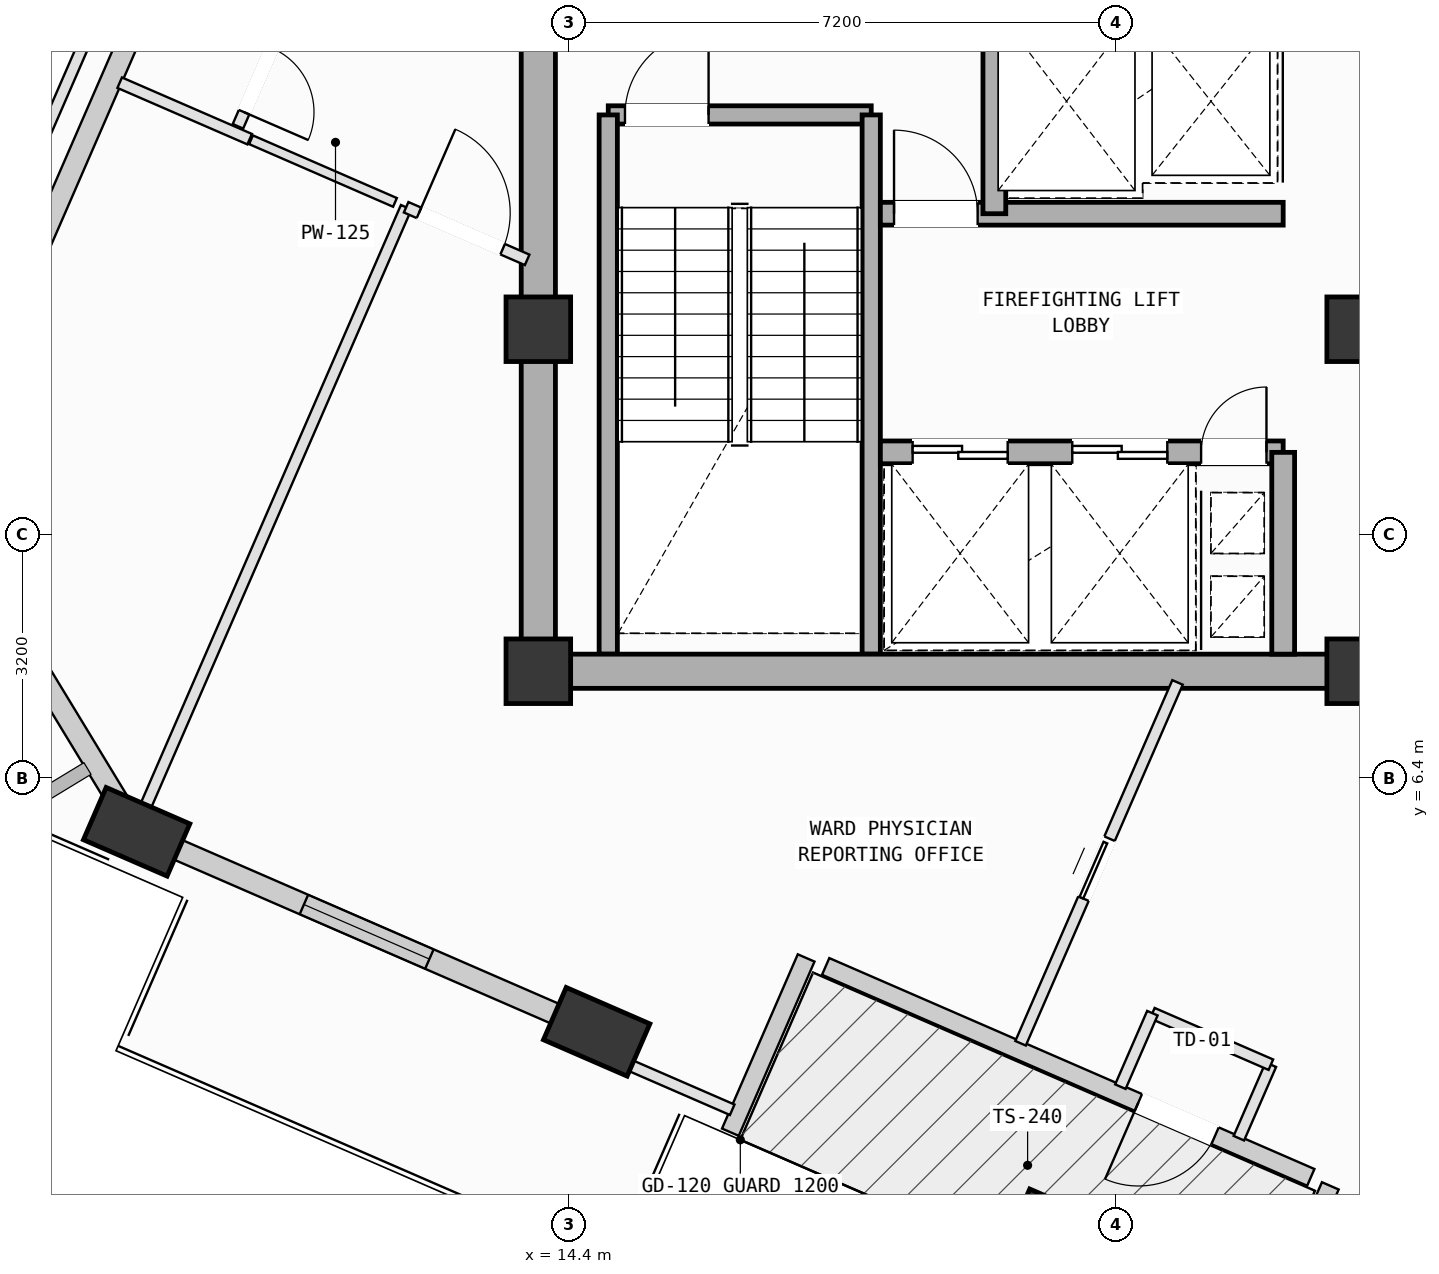
"""IFC4 building model, lengths in metres.
Left out: names, types, materials, properties, quantities, classifications, styles, units other than length and angle.
Written with IfcOpenShell. Run it as: python <this file> out.ifc"""

import sys

from ifc_helpers import new_model, si_unit, direction, frame, frame_2d, origin, origin_2d, place, context, subcontext, project, spatial, rectangle, extrude, element, fill, save


model = new_model("IFC4")
c1 = context("Model", 3, precision=1e-05, world=origin(), true_north=direction((0.0, 1.0)))
c2 = subcontext(c1, "Body", "Model", "MODEL_VIEW")
j1 = project(units=[si_unit("LENGTHUNIT", "METRE"), si_unit("PLANEANGLEUNIT", "RADIAN")], contexts=[c1])
p1 = place(None, origin())
s1 = spatial("IfcSite", under=j1, at=p1, CompositionType="ELEMENT")
p2 = place(p1, origin())
s2 = spatial("IfcBuilding", under=s1, at=p2, CompositionType="ELEMENT")
p3 = place(p2, frame((0.0, 0.0, 312.6)))
s3 = spatial("IfcBuildingStorey", under=s2, at=p3, CompositionType="ELEMENT", Elevation=312.6)
for number, where, z_axis, x_axis in (
    (1, (14.0, 7.8, 0.0), (0.0, 0.0, 1.0), (1.0, 0.0, 0.0)),
    (2, (14.0, 12.3, 0.0), (0.0, 0.0, 1.0), (1.0, 0.0, 0.0)),
    (3, (24.8, 7.8, 0.0), (0.0, 0.0, 1.0), (1.0, 0.0, 0.0)),
    (4, (24.8, 12.3, 0.0), (0.0, 0.0, 1.0), (1.0, 0.0, 0.0)),
):
    element("IfcColumn", number, at=place(p3, frame(where, z_axis=z_axis, x_axis=x_axis)), inside=s3, PredefinedType="COLUMN", context=c2, shape_type="SweptSolid", body=[
        extrude(rectangle(XDim=0.85, YDim=0.85, at=origin_2d()), origin(), (0.0, 0.0, 1.0), 4.0),
    ])
for number, where, z_axis, x_axis in (
    (5, (8.715, 5.688, 0.002), (0.0, 0.0, 1.0), (-0.917, 0.399, 0.0)),
    (6, (14.768, 3.056, 0.002), (0.0, 0.0, 1.0), (-0.917, 0.399, 0.0)),
    (7, (20.866, 0.404, 0.002), (0.0, 0.0, 1.0), (-0.917, 0.399, 0.0)),
):
    element("IfcColumn", number, at=place(p3, frame(where, z_axis=z_axis, x_axis=x_axis)), inside=s3, PredefinedType="COLUMN", context=c2, shape_type="SweptSolid", body=[
        extrude(rectangle(XDim=1.2, YDim=0.75, at=origin_2d()), origin(), (0.0, 0.0, 1.0), 3.996),
    ])
p4 = place(p3, frame((24.163, 1.141, 0.0), z_axis=(0.0, 0.0, 1.0), x_axis=(-0.917051093992, 0.39876972178, 0.0)))
e8 = element("IfcWall", 8, at=p4, inside=s3, PredefinedType="SOLIDWALL", context=c2, shape_type="SweptSolid", body=[
    extrude(rectangle(XDim=6.96, YDim=0.24, at=frame_2d((3.48, 0.0))), origin(), (0.0, 0.0, 1.0), 3.265),
])
p5 = place(p4, frame((1.373, 0.0, 0.0)))
e9 = element("IfcOpeningElement", 9, at=p5, cuts=e8, PredefinedType="OPENING", context=c2, shape_type="SweptSolid", body=[
    extrude(rectangle(XDim=1.1, YDim=2.15, at=frame_2d((0.55, 1.075))), frame((0.0, 0.13, 0.0), z_axis=(0.0, -1.0, 0.0), x_axis=(1.0, 0.0, 0.0)), (0.0, 0.0, 1.0), 0.26),
])
for number, where, z_axis, x_axis in (
    (10, (23.423, -1.264, 0.0), (0.0, 0.0, 1.0), (0.399, 0.917, 0.0)),
    (11, (17.524, 4.028, 0.0), (0.0, 0.0, 1.0), (-0.399, -0.917, 0.0)),
):
    element("IfcWall", number, at=place(p3, frame(where, z_axis=z_axis, x_axis=x_axis)), inside=s3, PredefinedType="SOLIDWALL", context=c2, shape_type="SweptSolid", body=[
        extrude(rectangle(XDim=2.5, YDim=0.24, at=frame_2d((1.25, 0.0))), origin(), (0.0, 0.0, 1.0), 3.265),
    ])
p6 = place(p3, frame((6.172, 10.498, 0.0), z_axis=(0.0, 0.0, 1.0), x_axis=(0.398740578379, 0.917063766133, 0.0)))
e12 = element("IfcWall", 12, at=p6, inside=s3, PredefinedType="SOLIDWALL", context=c2, shape_type="SweptSolid", body=[
    extrude(rectangle(XDim=7.405, YDim=0.28, at=frame_2d((3.702, 0.0))), origin(), (0.0, 0.0, 1.0), 3.265),
])
p7 = place(p3, frame((8.509, 6.027, 0.0), z_axis=(0.0, 0.0, 1.0), x_axis=(-0.51924554751, 0.854625099907, 0.0)))
e13 = element("IfcWall", 13, at=p7, inside=s3, PredefinedType="SOLIDWALL", context=c2, shape_type="SweptSolid", body=[
    extrude(rectangle(XDim=4.407, YDim=0.28, at=frame_2d((2.204, 0.0))), origin(), (0.0, 0.0, 1.0), 3.265),
])
p8 = place(p3, frame((14.403, 3.215, 0.0), z_axis=(0.0, 0.0, 1.0), x_axis=(-0.917061363729, 0.398746103624, 0.0)))
e14 = element("IfcWall", 14, at=p8, inside=s3, PredefinedType="SOLIDWALL", context=c2, shape_type="SweptSolid", body=[
    extrude(rectangle(XDim=5.805, YDim=0.28, at=frame_2d((2.902, 0.0))), origin(), (0.0, 0.0, 1.0), 3.245),
])
p9 = place(p8, frame((2.002, 0.0, 0.75)))
e15 = element("IfcOpeningElement", 15, at=p9, cuts=e14, PredefinedType="OPENING", context=c2, shape_type="SweptSolid", body=[
    extrude(rectangle(XDim=1.8, YDim=2.05, at=frame_2d((0.9, 1.025))), frame((0.0, 0.15, 0.0), z_axis=(0.0, -1.0, 0.0), x_axis=(1.0, 0.0, 0.0)), (0.0, 0.0, 1.0), 0.3),
])
p10 = place(p3, frame((14.92, 15.12, 0.0), z_axis=(0.0, 0.0, 1.0), x_axis=(1.0, 0.0, 0.0)))
e16 = element("IfcWall", 16, at=p10, inside=s3, PredefinedType="SOLIDWALL", context=c2, shape_type="SweptSolid", body=[
    extrude(rectangle(XDim=3.46, YDim=0.24, at=frame_2d((1.73, 0.0))), origin(), (0.0, 0.0, 1.0), 3.78),
])
p11 = place(p10, frame((0.22, 0.0, 0.0)))
e17 = element("IfcOpeningElement", 17, at=p11, cuts=e16, PredefinedType="OPENING", context=c2, shape_type="SweptSolid", body=[
    extrude(rectangle(XDim=1.1, YDim=2.15, at=frame_2d((0.55, 1.075))), frame((0.0, 0.13, 0.0), z_axis=(0.0, -1.0, 0.0), x_axis=(1.0, 0.0, 0.0)), (0.0, 0.0, 1.0), 0.26),
])
for number, where, z_axis, x_axis in (
    (18, (18.38, 15.12, 0.0), (0.0, 0.0, 1.0), (0.0, -1.0, 0.0)),
    (19, (14.92, 8.025, 0.0), (0.0, 0.0, 1.0), (0.0, 1.0, 0.0)),
):
    element("IfcWall", number, at=place(p3, frame(where, z_axis=z_axis, x_axis=x_axis)), inside=s3, PredefinedType="SOLIDWALL", context=c2, shape_type="SweptSolid", body=[
        extrude(rectangle(XDim=7.095, YDim=0.24, at=frame_2d((3.548, 0.0))), origin(), (0.0, 0.0, 1.0), 3.78),
    ])
for number, where, z_axis, x_axis in (
    (20, (14.0, 7.8, 0.0), (0.0, 0.0, 1.0), (1.0, 0.0, 0.0)),
    (21, (24.8, 7.8, 0.0), (0.0, 0.0, 1.0), (1.0, 0.0, 0.0)),
):
    element("IfcWall", number, at=place(p3, frame(where, z_axis=z_axis, x_axis=x_axis)), inside=s3, PredefinedType="SHEAR", context=c2, shape_type="SweptSolid", body=[
        extrude(rectangle(XDim=10.8, YDim=0.45, at=frame_2d((5.4, 0.0))), origin(), (0.0, 0.0, 1.0), 3.78),
    ])
p12 = place(p3, frame((14.0, 16.8, 0.0), z_axis=(0.0, 0.0, 1.0), x_axis=(0.0, -1.0, 0.0)))
e22 = element("IfcWall", 22, at=p12, inside=s3, PredefinedType="SHEAR", context=c2, shape_type="SweptSolid", body=[
    extrude(rectangle(XDim=9.0, YDim=0.45, at=frame_2d((4.5, 0.0))), origin(), (0.0, 0.0, 1.0), 3.78),
])
p13 = place(p3, frame((18.5, 10.68, 0.0), z_axis=(0.0, 0.0, 1.0), x_axis=(1.0, 0.0, 0.0)))
e23 = element("IfcWall", 23, at=p13, inside=s3, PredefinedType="SOLIDWALL", context=c2, shape_type="SweptSolid", body=[
    extrude(rectangle(XDim=5.3, YDim=0.3, at=frame_2d((2.65, 0.0))), origin(), (0.0, 0.0, 1.0), 3.78),
])
p14 = place(p13, frame((4.22, 0.0, 0.0)))
e24 = element("IfcOpeningElement", 24, at=p14, cuts=e23, PredefinedType="OPENING", context=c2, shape_type="SweptSolid", body=[
    extrude(rectangle(XDim=0.86, YDim=2.06, at=frame_2d((0.43, 1.03))), frame((0.0, 0.16, 0.0), z_axis=(0.0, -1.0, 0.0), x_axis=(1.0, 0.0, 0.0)), (0.0, 0.0, 1.0), 0.32),
])
p15 = place(p13, frame((0.425, 0.0, 0.0)))
e25 = element("IfcOpeningElement", 25, at=p15, cuts=e23, PredefinedType="OPENING", context=c2, shape_type="SweptSolid", body=[
    extrude(rectangle(XDim=1.25, YDim=2.18, at=frame_2d((0.625, 1.09))), frame((0.0, 0.16, 0.0), z_axis=(0.0, -1.0, 0.0), x_axis=(1.0, 0.0, 0.0)), (0.0, 0.0, 1.0), 0.32),
])
p16 = place(p13, frame((2.525, 0.0, 0.0)))
e26 = element("IfcOpeningElement", 26, at=p16, cuts=e23, PredefinedType="OPENING", context=c2, shape_type="SweptSolid", body=[
    extrude(rectangle(XDim=1.25, YDim=2.18, at=frame_2d((0.625, 1.09))), frame((0.0, 0.16, 0.0), z_axis=(0.0, -1.0, 0.0), x_axis=(1.0, 0.0, 0.0)), (0.0, 0.0, 1.0), 0.32),
])
p17 = place(p3, frame((18.5, 13.82, 0.0), z_axis=(0.0, 0.0, 1.0), x_axis=(1.0, 0.0, 0.0)))
e27 = element("IfcWall", 27, at=p17, inside=s3, PredefinedType="SOLIDWALL", context=c2, shape_type="SweptSolid", body=[
    extrude(rectangle(XDim=5.3, YDim=0.3, at=frame_2d((2.65, 0.0))), origin(), (0.0, 0.0, 1.0), 3.78),
])
p18 = place(p17, frame((0.18, 0.0, 0.0)))
e28 = element("IfcOpeningElement", 28, at=p18, cuts=e27, PredefinedType="OPENING", context=c2, shape_type="SweptSolid", body=[
    extrude(rectangle(XDim=1.1, YDim=2.15, at=frame_2d((0.55, 1.075))), frame((0.0, 0.16, 0.0), z_axis=(0.0, -1.0, 0.0), x_axis=(1.0, 0.0, 0.0)), (0.0, 0.0, 1.0), 0.32),
])
p19 = place(p3, frame((23.8, 8.025, 0.0), z_axis=(0.0, 0.0, 1.0), x_axis=(0.0, 1.0, 0.0)))
e29 = element("IfcWall", 29, at=p19, inside=s3, PredefinedType="SOLIDWALL", context=c2, shape_type="SweptSolid", body=[
    extrude(rectangle(XDim=2.655, YDim=0.3, at=frame_2d((1.328, 0.0))), origin(), (0.0, 0.0, 1.0), 3.78),
])
p20 = place(p3, frame((20.0, 13.82, 0.0), z_axis=(0.0, 0.0, 1.0), x_axis=(0.0, 1.0, 0.0)))
e30 = element("IfcWall", 30, at=p20, inside=s3, PredefinedType="SOLIDWALL", context=c2, shape_type="SweptSolid", body=[
    extrude(rectangle(XDim=2.73, YDim=0.3, at=frame_2d((1.365, 0.0))), origin(), (0.0, 0.0, 1.0), 3.78),
])
p21 = place(p3, frame((23.217, 1.656, 0.0), z_axis=(0.0, 0.0, 1.0), x_axis=(0.399081590712, 0.916915418103, 0.0)))
e31 = element("IfcWall", 31, at=p21, inside=s3, PredefinedType="PARTITIONING", context=c2, shape_type="SweptSolid", body=[
    extrude(rectangle(XDim=1.055, YDim=0.15, at=frame_2d((0.527, 0.0))), origin(), (0.0, 0.0, 1.0), 3.78),
])
p22 = place(p3, frame((23.638, 2.623, 0.0), z_axis=(0.0, 0.0, 1.0), x_axis=(-0.917022099739, 0.398836393262, 0.0)))
e32 = element("IfcWall", 32, at=p22, inside=s3, PredefinedType="PARTITIONING", context=c2, shape_type="SweptSolid", body=[
    extrude(rectangle(XDim=1.7, YDim=0.15, at=frame_2d((0.85, 0.0))), origin(), (0.0, 0.0, 1.0), 3.78),
])
p23 = place(p3, frame((22.079, 3.301, 0.0), z_axis=(0.0, 0.0, 1.0), x_axis=(-0.399276181733, -0.916830699039, 0.0)))
e33 = element("IfcWall", 33, at=p23, inside=s3, PredefinedType="PARTITIONING", context=c2, shape_type="SweptSolid", body=[
    extrude(rectangle(XDim=1.055, YDim=0.15, at=frame_2d((0.527, 0.0))), origin(), (0.0, 0.0, 1.0), 2.745),
])
p24 = place(p3, frame((20.345, 2.905, 0.0), z_axis=(0.0, 0.0, 1.0), x_axis=(0.398819215719, 0.917029570501, 0.0)))
e34 = element("IfcWall", 34, at=p24, inside=s3, PredefinedType="PARTITIONING", context=c2, shape_type="SweptSolid", body=[
    extrude(rectangle(XDim=5.178, YDim=0.15, at=frame_2d((2.589, 0.0))), origin(), (0.0, 0.0, 1.0), 3.78),
])
p25 = place(p24, frame((2.075, 0.0, 0.0)))
e35 = element("IfcOpeningElement", 35, at=p25, cuts=e34, PredefinedType="OPENING", context=c2, shape_type="SweptSolid", body=[
    extrude(rectangle(XDim=0.86, YDim=2.06, at=frame_2d((0.43, 1.03))), frame((0.0, 0.085, 0.0), z_axis=(0.0, -1.0, 0.0), x_axis=(1.0, 0.0, 0.0)), (0.0, 0.0, 1.0), 0.17),
])
p26 = place(p3, frame((16.551, 2.03, 0.0), z_axis=(0.0, 0.0, 1.0), x_axis=(-0.917074823453, 0.398715146676, 0.0)))
e36 = element("IfcWall", 36, at=p26, inside=s3, PredefinedType="PARTITIONING", context=c2, shape_type="SweptSolid", body=[
    extrude(rectangle(XDim=2.443, YDim=0.15, at=frame_2d((1.221, 0.0))), origin(), (0.0, 0.0, 1.0), 3.245),
])
p27 = place(p3, frame((8.988, 5.318, 0.0), z_axis=(0.0, 0.0, 1.0), x_axis=(-0.916831392251, 0.399274589954, 0.0)))
e37 = element("IfcWall", 37, at=p27, inside=s3, PredefinedType="PARTITIONING", context=c2, shape_type="SweptSolid", body=[
    extrude(rectangle(XDim=0.423, YDim=0.15, at=frame_2d((0.211, 0.0))), origin(), (0.0, 0.0, 1.0), 3.265),
])
p28 = place(p3, frame((8.6, 5.487, 0.0), z_axis=(0.0, 0.0, 1.0), x_axis=(0.398808773401, 0.917034111829, 0.0)))
e38 = element("IfcWall", 38, at=p28, inside=s3, PredefinedType="PARTITIONING", context=c2, shape_type="SweptSolid", body=[
    extrude(rectangle(XDim=9.179, YDim=0.15, at=frame_2d((4.59, 0.0))), origin(), (0.0, 0.0, 1.0), 3.78),
])
p29 = place(p3, frame((12.261, 13.905, 0.0), z_axis=(0.0, 0.0, 1.0), x_axis=(0.91708123515, -0.398700398965, 0.0)))
e39 = element("IfcWall", 39, at=p29, inside=s3, PredefinedType="PARTITIONING", context=c2, shape_type="SweptSolid", body=[
    extrude(rectangle(XDim=1.736, YDim=0.15, at=frame_2d((0.868, 0.0))), origin(), (0.0, 0.0, 1.0), 3.78),
])
p30 = place(p29, frame((0.184, 0.0, 0.0)))
e40 = element("IfcOpeningElement", 40, at=p30, cuts=e39, PredefinedType="OPENING", context=c2, shape_type="SweptSolid", body=[
    extrude(rectangle(XDim=1.2, YDim=2.15, at=frame_2d((0.6, 1.075))), frame((0.0, 0.085, 0.0), z_axis=(0.0, -1.0, 0.0), x_axis=(1.0, 0.0, 0.0)), (0.0, 0.0, 1.0), 0.17),
])
p31 = place(p3, frame((8.492, 15.544, 0.0), z_axis=(0.0, 0.0, 1.0), x_axis=(0.917176199692, -0.398481892585, 0.0)))
e41 = element("IfcWall", 41, at=p31, inside=s3, PredefinedType="PARTITIONING", context=c2, shape_type="SweptSolid", body=[
    extrude(rectangle(XDim=1.864, YDim=0.15, at=frame_2d((0.932, 0.0))), origin(), (0.0, 0.0, 1.0), 3.78),
])
p32 = place(p3, frame((10.22, 14.793, 0.0), z_axis=(0.0, 0.0, 1.0), x_axis=(0.916985473765, -0.398920594735, 0.0)))
e42 = element("IfcWall", 42, at=p32, inside=s3, PredefinedType="PARTITIONING", context=c2, shape_type="SweptSolid", body=[
    extrude(rectangle(XDim=2.065, YDim=0.125, at=frame_2d((1.033, 0.0))), origin(), (0.0, 0.0, 1.0), 3.78),
])
p33 = place(p3, frame((5.828, 11.01, 0.0), z_axis=(0.0, 0.0, 1.0), x_axis=(0.398767783479, 0.917051936838, 0.0)))
e43 = element("IfcWall", 43, at=p33, inside=s3, PredefinedType="PARTITIONING", context=c2, shape_type="SweptSolid", body=[
    extrude(rectangle(XDim=6.641, YDim=0.15, at=frame_2d((3.32, 0.0))), origin(), (0.0, 0.0, 1.0), 3.78),
])
p34 = place(p3, frame((10.576, 16.186, 0.0), z_axis=(0.0, 0.0, 1.0), x_axis=(-0.3981603712, -0.917315822825, 0.0)))
e44 = element("IfcWall", 44, at=p34, inside=s3, PredefinedType="PARTITIONING", context=c2, shape_type="SweptSolid", body=[
    extrude(rectangle(XDim=1.326, YDim=0.15, at=frame_2d((0.663, 0.0))), origin(), (0.0, 0.0, 1.0), 3.78),
])
p35 = place(p34, frame((0.203, 0.0, 0.0)))
e45 = element("IfcOpeningElement", 45, at=p35, cuts=e44, PredefinedType="OPENING", context=c2, shape_type="SweptSolid", body=[
    extrude(rectangle(XDim=0.92, YDim=2.1, at=frame_2d((0.46, 1.05))), frame((0.0, 0.085, 0.0), z_axis=(0.0, -1.0, 0.0), x_axis=(1.0, 0.0, 0.0)), (0.0, 0.0, 1.0), 0.17),
])
p36 = place(p5, origin())
e46 = element("IfcDoor", 46, at=p36, inside=s3, OperationType="SINGLE_SWING_RIGHT", PredefinedType="DOOR", context=c2, shape_type="SweptSolid", body=[
    extrude(rectangle(XDim=1.1, YDim=2.15, at=frame_2d((0.55, 1.075))), frame((0.0, 0.025, 0.0), z_axis=(0.0, -1.0, 0.0), x_axis=(1.0, 0.0, 0.0)), (0.0, 0.0, 1.0), 0.05),
])
fill(e9, e46)
p37 = place(p9, origin())
e47 = element("IfcWindow", 47, at=p37, inside=s3, PartitioningType="SINGLE_PANEL", PredefinedType="WINDOW", context=c2, shape_type="SweptSolid", body=[
    extrude(rectangle(XDim=1.8, YDim=2.05, at=frame_2d((0.9, 1.025))), frame((0.0, 0.03, 0.0), z_axis=(0.0, -1.0, 0.0), x_axis=(1.0, 0.0, 0.0)), (0.0, 0.0, 1.0), 0.06),
])
fill(e15, e47)
p38 = place(p11, origin())
e48 = element("IfcDoor", 48, at=p38, inside=s3, OperationType="SINGLE_SWING_RIGHT", PredefinedType="DOOR", context=c2, shape_type="SweptSolid", body=[
    extrude(rectangle(XDim=1.1, YDim=2.15, at=frame_2d((0.55, 1.075))), frame((0.0, 0.025, 0.0), z_axis=(0.0, -1.0, 0.0), x_axis=(1.0, 0.0, 0.0)), (0.0, 0.0, 1.0), 0.05),
])
fill(e17, e48)
p39 = place(p14, origin())
e49 = element("IfcDoor", 49, at=p39, inside=s3, OperationType="SINGLE_SWING_RIGHT", PredefinedType="DOOR", context=c2, shape_type="SweptSolid", body=[
    extrude(rectangle(XDim=0.86, YDim=2.06, at=frame_2d((0.43, 1.03))), frame((0.0, 0.025, 0.0), z_axis=(0.0, -1.0, 0.0), x_axis=(1.0, 0.0, 0.0)), (0.0, 0.0, 1.0), 0.05),
])
fill(e24, e49)
p40 = place(p18, origin())
e50 = element("IfcDoor", 50, at=p40, inside=s3, OperationType="SINGLE_SWING_LEFT", PredefinedType="DOOR", context=c2, shape_type="SweptSolid", body=[
    extrude(rectangle(XDim=1.1, YDim=2.15, at=frame_2d((0.55, 1.075))), frame((0.0, 0.025, 0.0), z_axis=(0.0, -1.0, 0.0), x_axis=(1.0, 0.0, 0.0)), (0.0, 0.0, 1.0), 0.05),
])
fill(e28, e50)
p41 = place(p15, origin())
e51 = element("IfcDoor", 51, at=p41, inside=s3, OperationType="DOUBLE_DOOR_SLIDING", PredefinedType="DOOR", context=c2, shape_type="SweptSolid", body=[
    extrude(rectangle(XDim=1.25, YDim=2.18, at=frame_2d((0.625, 1.09))), frame((0.0, 0.025, 0.0), z_axis=(0.0, -1.0, 0.0), x_axis=(1.0, 0.0, 0.0)), (0.0, 0.0, 1.0), 0.05),
])
fill(e25, e51)
p42 = place(p16, origin())
e52 = element("IfcDoor", 52, at=p42, inside=s3, OperationType="DOUBLE_DOOR_SLIDING", PredefinedType="DOOR", context=c2, shape_type="SweptSolid", body=[
    extrude(rectangle(XDim=1.25, YDim=2.18, at=frame_2d((0.625, 1.09))), frame((0.0, 0.025, 0.0), z_axis=(0.0, -1.0, 0.0), x_axis=(1.0, 0.0, 0.0)), (0.0, 0.0, 1.0), 0.05),
])
fill(e26, e52)
p43 = place(p30, origin())
e53 = element("IfcDoor", 53, at=p43, inside=s3, OperationType="SINGLE_SWING_LEFT", PredefinedType="DOOR", context=c2, shape_type="SweptSolid", body=[
    extrude(rectangle(XDim=1.2, YDim=2.15, at=frame_2d((0.6, 1.075))), frame((0.0, 0.025, 0.0), z_axis=(0.0, -1.0, 0.0), x_axis=(1.0, 0.0, 0.0)), (0.0, 0.0, 1.0), 0.05),
])
fill(e40, e53)
p44 = place(p35, origin())
e54 = element("IfcDoor", 54, at=p44, inside=s3, OperationType="SINGLE_SWING_RIGHT", PredefinedType="DOOR", context=c2, shape_type="SweptSolid", body=[
    extrude(rectangle(XDim=0.92, YDim=2.1, at=frame_2d((0.46, 1.05))), frame((0.0, 0.025, 0.0), z_axis=(0.0, -1.0, 0.0), x_axis=(1.0, 0.0, 0.0)), (0.0, 0.0, 1.0), 0.05),
])
fill(e45, e54)
p45 = place(p25, origin())
e55 = element("IfcDoor", 55, at=p45, inside=s3, OperationType="SLIDING_TO_LEFT", PredefinedType="DOOR", context=c2, shape_type="SweptSolid", body=[
    extrude(rectangle(XDim=0.86, YDim=2.06, at=frame_2d((0.43, 1.03))), frame((0.0, 0.025, 0.0), z_axis=(0.0, -1.0, 0.0), x_axis=(1.0, 0.0, 0.0)), (0.0, 0.0, 1.0), 0.05),
])
fill(e35, e55)
save(model, sys.argv[1])
